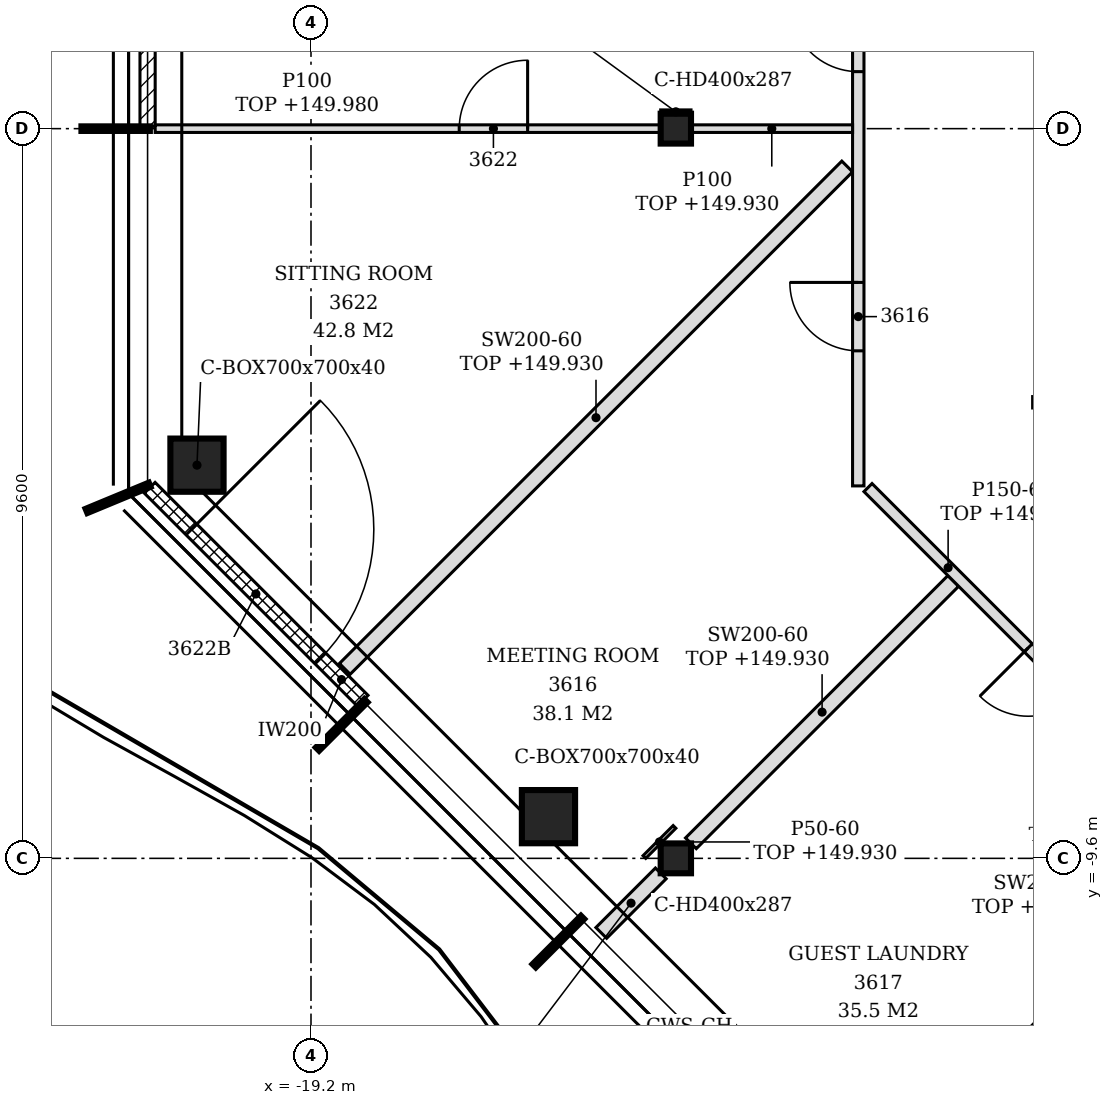
"""IFC4 building model, lengths in metres.
Left out: names, types, materials, properties, quantities, classifications, styles, units other than length and angle.
Written with IfcOpenShell. Run it as: python <this file> out.ifc"""

import sys

from ifc_helpers import new_model, si_unit, direction, frame, frame_2d, origin, origin_2d, place, context, subcontext, project, spatial, polyline, rectangle, hollow_rectangle, i_section, outline, extrude, element, fill, save


model = new_model("IFC4")
c1 = context("Model", 3, precision=1e-05, world=origin(), true_north=direction((0.0, 1.0)))
c2 = subcontext(c1, "Body", "Model", "MODEL_VIEW")
j1 = project(units=[si_unit("LENGTHUNIT", "METRE"), si_unit("PLANEANGLEUNIT", "RADIAN")], contexts=[c1])
p1 = place(None, origin())
s1 = spatial("IfcSite", under=j1, at=p1, CompositionType="ELEMENT")
p2 = place(p1, origin())
s2 = spatial("IfcBuilding", under=s1, at=p2, CompositionType="ELEMENT")
p3 = place(p2, frame((0.0, 0.0, 147.0)))
s3 = spatial("IfcBuildingStorey", under=s2, at=p3, CompositionType="ELEMENT", Elevation=147.0)
for number, where, z_axis, x_axis in (
    (1, (-20.7, -4.427, -0.15), (0.0, 0.0, 1.0), (1.0, 0.0, 0.0)),
    (2, (-16.076, -9.052, -0.15), (0.0, 0.0, 1.0), (1.0, 0.0, 0.0)),
):
    element("IfcColumn", number, at=place(p3, frame(where, z_axis=z_axis, x_axis=x_axis)), inside=s3, PredefinedType="COLUMN", context=c2, shape_type="SweptSolid", body=[
        extrude(hollow_rectangle(XDim=0.7, YDim=0.7, WallThickness=0.04, at=origin_2d()), origin(), (0.0, 0.0, 1.0), 3.6),
    ])
for number, where, z_axis, x_axis in (
    (3, (-14.4, -9.6, -0.15), (0.0, 0.0, 1.0), (1.0, 0.0, 0.0)),
    (4, (-14.4, 0.0, -0.15), (0.0, 0.0, 1.0), (1.0, 0.0, 0.0)),
):
    element("IfcColumn", number, at=place(p3, frame(where, z_axis=z_axis, x_axis=x_axis)), inside=s3, PredefinedType="COLUMN", context=c2, shape_type="SweptSolid", body=[
        extrude(i_section(OverallWidth=0.399, OverallDepth=0.393, WebThickness=0.023, FlangeThickness=0.037, FilletRadius=0.015, at=origin_2d()), origin(), (0.0, 0.0, 1.0), 3.6),
    ])
p4 = place(p3, frame((-21.35, 4.77, 0.0), z_axis=(0.0, 0.0, 1.0), x_axis=(0.0, -1.0, 0.0)))
e5 = element("IfcWall", 5, at=p4, inside=s3, PredefinedType="NOTDEFINED", context=c2, shape_type="SweptSolid", body=[
    extrude(rectangle(XDim=4.74, YDim=0.2, at=frame_2d((2.37, 0.0))), origin(), (0.0, 0.0, 1.0), 3.45),
])
p5 = place(p4, frame((1.17, 0.0, 0.0)))
e6 = element("IfcOpeningElement", 6, at=p5, cuts=e5, PredefinedType="OPENING", context=c2, shape_type="SweptSolid", body=[
    extrude(rectangle(XDim=2.4, YDim=2.4, at=frame_2d((1.2, 1.2))), frame((0.0, 0.11, 0.0), z_axis=(0.0, -1.0, 0.0), x_axis=(1.0, 0.0, 0.0)), (0.0, 0.0, 1.0), 0.22),
])
p6 = place(p3, frame((-21.322, -4.725, 0.0), z_axis=(0.0, 0.0, 1.0), x_axis=(0.707106781187, -0.707106781187, 0.0)))
e7 = element("IfcWall", 7, at=p6, inside=s3, PredefinedType="NOTDEFINED", context=c2, shape_type="SweptSolid", body=[
    extrude(rectangle(XDim=3.962, YDim=0.2, at=frame_2d((1.981, 0.0))), origin(), (0.0, 0.0, 1.0), 3.45),
])
p7 = place(p6, frame((0.775, 0.0, 0.0)))
e8 = element("IfcOpeningElement", 8, at=p7, cuts=e7, PredefinedType="OPENING", context=c2, shape_type="SweptSolid", body=[
    extrude(rectangle(XDim=2.4, YDim=2.4, at=frame_2d((1.2, 1.2))), frame((0.0, 0.11, 0.0), z_axis=(0.0, -1.0, 0.0), x_axis=(1.0, 0.0, 0.0)), (0.0, 0.0, 1.0), 0.22),
])
p8 = place(p3, frame((-11.102, -13.326, 0.0), z_axis=(0.0, 0.0, 1.0), x_axis=(0.707088722709, 0.707124839203, 0.0)))
e9 = element("IfcWall", 9, at=p8, inside=s3, PredefinedType="PARTITIONING", context=c2, shape_type="SweptSolid", body=[
    extrude(rectangle(XDim=6.76, YDim=0.2, at=frame_2d((3.38, 0.0))), origin(), (0.0, 0.0, 1.0), 2.93),
])
p9 = place(p3, frame((-15.381, -10.581, 0.0), z_axis=(0.0, 0.0, 1.0), x_axis=(0.707217034054, 0.706996511125, 0.0)))
e10 = element("IfcWall", 10, at=p9, inside=s3, PredefinedType="PARTITIONING", context=c2, shape_type="SweptSolid", body=[
    extrude(rectangle(XDim=1.107, YDim=0.2, at=frame_2d((0.554, 0.0))), origin(), (0.0, 0.0, 1.0), 2.63),
])
p10 = place(p3, frame((-14.202, -9.402, 0.0), z_axis=(0.0, 0.0, 1.0), x_axis=(0.707081776084, 0.707131785404, 0.0)))
e11 = element("IfcWall", 11, at=p10, inside=s3, PredefinedType="PARTITIONING", context=c2, shape_type="SweptSolid", body=[
    extrude(rectangle(XDim=4.882, YDim=0.2, at=frame_2d((2.441, 0.0))), origin(), (0.0, 0.0, 1.0), 2.93),
])
p11 = place(p3, frame((-8.322, -8.272, 0.0), z_axis=(0.0, 0.0, 1.0), x_axis=(-0.707106781187, 0.707106781187, 0.0)))
e12 = element("IfcWall", 12, at=p11, inside=s3, PredefinedType="PARTITIONING", context=c2, shape_type="SweptSolid", body=[
    extrude(rectangle(XDim=5.021, YDim=0.15, at=frame_2d((2.51, 0.0))), origin(), (0.0, 0.0, 1.0), 2.93),
])
p12 = place(p11, frame((1.139, 0.0, 0.0)))
e13 = element("IfcOpeningElement", 13, at=p12, cuts=e12, PredefinedType="OPENING", context=c2, shape_type="SweptSolid", body=[
    extrude(rectangle(XDim=0.9, YDim=2.1, at=frame_2d((0.45, 1.05))), frame((0.0, 0.085, 0.0), z_axis=(0.0, -1.0, 0.0), x_axis=(1.0, 0.0, 0.0)), (0.0, 0.0, 1.0), 0.17),
])
p13 = place(p3, frame((-18.755, -7.107, 0.0), z_axis=(0.0, 0.0, 1.0), x_axis=(0.707106781187, 0.707106781187, 0.0)))
e14 = element("IfcWall", 14, at=p13, inside=s3, PredefinedType="PARTITIONING", context=c2, shape_type="SweptSolid", body=[
    extrude(rectangle(XDim=9.347, YDim=0.2, at=frame_2d((4.674, 0.0))), origin(), (0.0, 0.0, 1.0), 2.93),
])
p14 = place(p3, frame((-12.0, -4.7, 0.0), z_axis=(0.0, 0.0, 1.0), x_axis=(0.0, 1.0, 0.0)))
e15 = element("IfcWall", 15, at=p14, inside=s3, PredefinedType="PARTITIONING", context=c2, shape_type="SweptSolid", body=[
    extrude(outline(polyline([(0.0, 0.0), (13.913, 0.0), (13.913, 3.45), (9.6, 3.45), (9.598, 2.93), (9.4, 2.93), (9.398, 3.45), (4.8, 3.45), (4.798, 2.93), (4.6, 2.93), (4.598, 3.45), (0.0, 3.45), (0.0, 0.0)])), frame((0.0, 0.075, 0.0), z_axis=(0.0, -1.0, 0.0), x_axis=(1.0, 0.0, 0.0)), (0.0, 0.0, 1.0), 0.15),
])
p15 = place(p14, frame((12.347, 0.0, 0.0)))
e16 = element("IfcOpeningElement", 16, at=p15, cuts=e15, PredefinedType="OPENING", context=c2, shape_type="SweptSolid", body=[
    extrude(rectangle(XDim=0.9, YDim=2.1, at=frame_2d((0.45, 1.05))), frame((0.0, 0.085, 0.0), z_axis=(0.0, -1.0, 0.0), x_axis=(1.0, 0.0, 0.0)), (0.0, 0.0, 1.0), 0.17),
])
p16 = place(p14, frame((5.45, 0.0, 0.0)))
e17 = element("IfcOpeningElement", 17, at=p16, cuts=e15, PredefinedType="OPENING", context=c2, shape_type="SweptSolid", body=[
    extrude(rectangle(XDim=0.9, YDim=2.1, at=frame_2d((0.45, 1.05))), frame((0.0, 0.085, 0.0), z_axis=(0.0, -1.0, 0.0), x_axis=(1.0, 0.0, 0.0)), (0.0, 0.0, 1.0), 0.17),
])
p17 = place(p14, frame((1.777, 0.0, 0.0)))
e18 = element("IfcOpeningElement", 18, at=p17, cuts=e15, PredefinedType="OPENING", context=c2, shape_type="SweptSolid", body=[
    extrude(rectangle(XDim=0.9, YDim=2.1, at=frame_2d((0.45, 1.05))), frame((0.0, 0.085, 0.0), z_axis=(0.0, -1.0, 0.0), x_axis=(1.0, 0.0, 0.0)), (0.0, 0.0, 1.0), 0.17),
])
p18 = place(p3, frame((-9.706, -3.6, 0.0), z_axis=(0.0, 0.0, 1.0), x_axis=(1.0, 0.0, 0.0)))
e19 = element("IfcWall", 19, at=p18, inside=s3, PredefinedType="PARTITIONING", context=c2, shape_type="SweptSolid", body=[
    extrude(outline(polyline([(0.0, 0.0), (4.981, 0.0), (4.981, 2.83), (4.756, 2.83), (4.754, 3.45), (0.0, 3.45), (0.0, 0.0)])), frame((0.0, 0.075, 0.0), z_axis=(0.0, -1.0, 0.0), x_axis=(1.0, 0.0, 0.0)), (0.0, 0.0, 1.0), 0.15),
])
p19 = place(p3, frame((-21.25, 0.0, 0.0), z_axis=(0.0, 0.0, 1.0), x_axis=(1.0, 0.0, 0.0)))
e20 = element("IfcWall", 20, at=p19, inside=s3, PredefinedType="PARTITIONING", context=c2, shape_type="SweptSolid", body=[
    extrude(outline(polyline([(0.0, 0.0), (6.65, 0.0), (6.65, 2.98), (0.7, 2.98), (0.698, 2.93), (0.4, 2.93), (0.398, 2.98), (0.0, 2.98), (0.0, 0.0)])), frame((0.0, 0.05, 0.0), z_axis=(0.0, -1.0, 0.0), x_axis=(1.0, 0.0, 0.0)), (0.0, 0.0, 1.0), 0.1),
])
p20 = place(p19, frame((4.0, 0.0, 0.0)))
e21 = element("IfcOpeningElement", 21, at=p20, cuts=e20, PredefinedType="OPENING", context=c2, shape_type="SweptSolid", body=[
    extrude(rectangle(XDim=0.9, YDim=2.1, at=frame_2d((0.45, 1.05))), frame((0.0, 0.06, 0.0), z_axis=(0.0, -1.0, 0.0), x_axis=(1.0, 0.0, 0.0)), (0.0, 0.0, 1.0), 0.12),
])
p21 = place(p3, frame((-14.2, 0.0, 0.0), z_axis=(0.0, 0.0, 1.0), x_axis=(1.0, 0.0, 0.0)))
e22 = element("IfcWall", 22, at=p21, inside=s3, PredefinedType="PARTITIONING", context=c2, shape_type="SweptSolid", body=[
    extrude(rectangle(XDim=2.125, YDim=0.1, at=frame_2d((1.063, 0.0))), origin(), (0.0, 0.0, 1.0), 2.93),
])
p22 = place(p3, frame((-14.814, -9.582, 0.0), z_axis=(0.0, 0.0, 1.0), x_axis=(0.707106781187, 0.707106781187, 0.0)))
e23 = element("IfcWall", 23, at=p22, inside=s3, PredefinedType="PARTITIONING", context=c2, shape_type="SweptSolid", body=[
    extrude(rectangle(XDim=0.56, YDim=0.05, at=frame_2d((0.28, 0.0))), origin(), (0.0, 0.0, 1.0), 2.93),
])
p23 = place(p3, frame((-14.6, 0.221, 0.0), z_axis=(0.0, 0.0, 1.0), x_axis=(1.0, 0.0, 0.0)))
e24 = element("IfcWall", 24, at=p23, inside=s3, PredefinedType="PARTITIONING", context=c2, shape_type="SweptSolid", body=[
    extrude(rectangle(XDim=0.399, YDim=0.05, at=frame_2d((0.2, 0.0))), origin(), (0.0, 0.0, 1.0), 2.93),
])
p24 = place(p7, origin())
e25 = element("IfcDoor", 25, at=p24, inside=s3, OperationType="SINGLE_SWING_LEFT", PredefinedType="DOOR", context=c2, shape_type="SweptSolid", body=[
    extrude(rectangle(XDim=2.4, YDim=2.4, at=frame_2d((1.2, 1.2))), frame((0.0, 0.025, 0.0), z_axis=(0.0, -1.0, 0.0), x_axis=(1.0, 0.0, 0.0)), (0.0, 0.0, 1.0), 0.05),
])
fill(e8, e25)
p25 = place(p16, origin())
e26 = element("IfcDoor", 26, at=p25, inside=s3, OperationType="SINGLE_SWING_RIGHT", PredefinedType="DOOR", context=c2, shape_type="SweptSolid", body=[
    extrude(rectangle(XDim=0.9, YDim=2.1, at=frame_2d((0.45, 1.05))), frame((0.0, 0.025, 0.0), z_axis=(0.0, -1.0, 0.0), x_axis=(1.0, 0.0, 0.0)), (0.0, 0.0, 1.0), 0.05),
])
fill(e17, e26)
p26 = place(p17, origin())
e27 = element("IfcDoor", 27, at=p26, inside=s3, OperationType="SINGLE_SWING_RIGHT", PredefinedType="DOOR", context=c2, shape_type="SweptSolid", body=[
    extrude(rectangle(XDim=0.9, YDim=2.1, at=frame_2d((0.45, 1.05))), frame((0.0, 0.025, 0.0), z_axis=(0.0, -1.0, 0.0), x_axis=(1.0, 0.0, 0.0)), (0.0, 0.0, 1.0), 0.05),
])
fill(e18, e27)
p27 = place(p12, origin())
e28 = element("IfcDoor", 28, at=p27, inside=s3, OperationType="SINGLE_SWING_RIGHT", PredefinedType="DOOR", context=c2, shape_type="SweptSolid", body=[
    extrude(rectangle(XDim=0.9, YDim=2.1, at=frame_2d((0.45, 1.05))), frame((0.0, 0.025, 0.0), z_axis=(0.0, -1.0, 0.0), x_axis=(1.0, 0.0, 0.0)), (0.0, 0.0, 1.0), 0.05),
])
fill(e13, e28)
p28 = place(p20, origin())
e29 = element("IfcDoor", 29, at=p28, inside=s3, OperationType="SINGLE_SWING_RIGHT", PredefinedType="DOOR", context=c2, shape_type="SweptSolid", body=[
    extrude(rectangle(XDim=0.9, YDim=2.1, at=frame_2d((0.45, 1.05))), frame((0.0, 0.025, 0.0), z_axis=(0.0, -1.0, 0.0), x_axis=(1.0, 0.0, 0.0)), (0.0, 0.0, 1.0), 0.05),
])
fill(e21, e29)
save(model, sys.argv[1])
